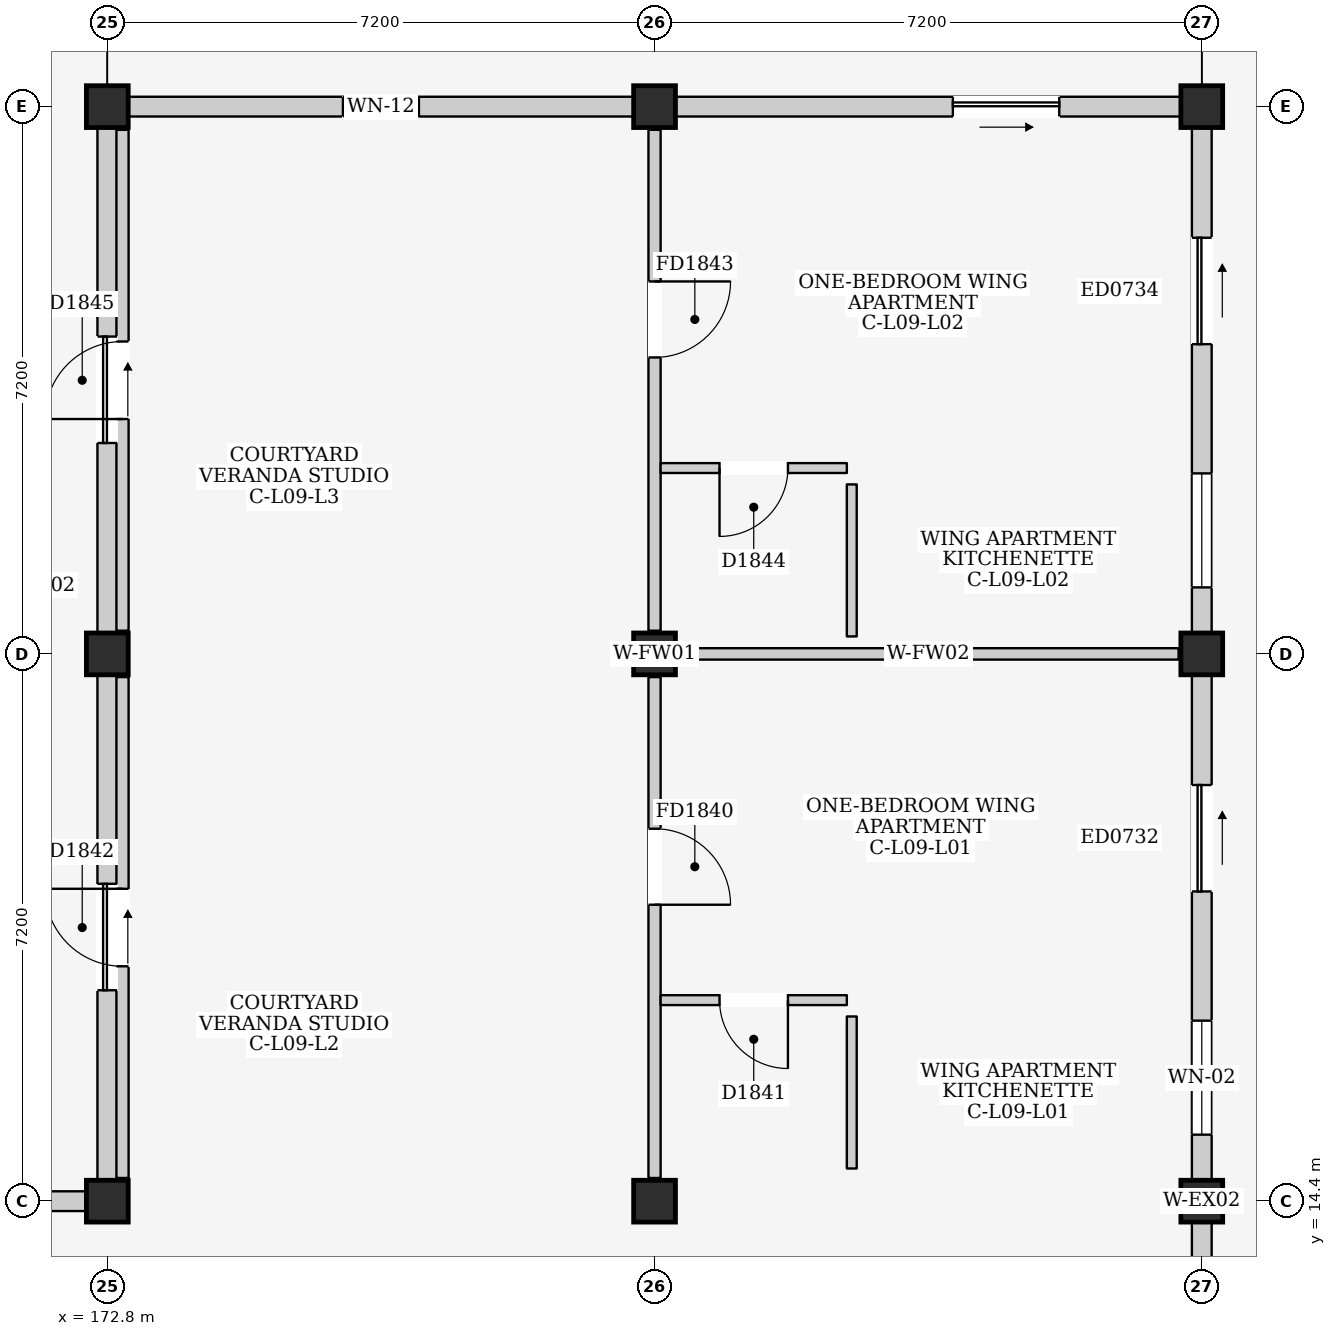
"""IFC4 building model, lengths in metres.
Left out: names, types, materials, properties, quantities, classifications, styles, units other than length and angle.
Written with IfcOpenShell. Run it as: python <this file> out.ifc"""

import sys

from ifc_helpers import new_model, si_unit, direction, frame, frame_2d, origin, origin_2d, place, context, subcontext, project, spatial, rectangle, extrude, element, fill, save


model = new_model("IFC4")
c1 = context("Model", 3, precision=1e-05, world=origin(), true_north=direction((0.0, 1.0)))
c2 = subcontext(c1, "Body", "Model", "MODEL_VIEW")
j1 = project(units=[si_unit("LENGTHUNIT", "METRE"), si_unit("PLANEANGLEUNIT", "RADIAN")], contexts=[c1])
p1 = place(None, origin())
s1 = spatial("IfcSite", under=j1, at=p1, CompositionType="ELEMENT")
p2 = place(p1, origin())
s2 = spatial("IfcBuilding", under=s1, at=p2, CompositionType="ELEMENT")
p3 = place(p2, frame((0.0, 0.0, 31.5)))
s3 = spatial("IfcBuildingStorey", under=s2, at=p3, CompositionType="ELEMENT", Elevation=31.5)
for number, where, z_axis, x_axis in (
    (1, (172.8, 14.4, 0.0), (0.0, 0.0, 1.0), (1.0, 0.0, 0.0)),
    (2, (172.8, 21.6, 0.0), (0.0, 0.0, 1.0), (1.0, 0.0, 0.0)),
    (3, (172.8, 28.8, 0.0), (0.0, 0.0, 1.0), (1.0, 0.0, 0.0)),
    (4, (180.0, 14.4, 0.0), (0.0, 0.0, 1.0), (1.0, 0.0, 0.0)),
    (5, (180.0, 21.6, 0.0), (0.0, 0.0, 1.0), (1.0, 0.0, 0.0)),
    (6, (180.0, 28.8, 0.0), (0.0, 0.0, 1.0), (1.0, 0.0, 0.0)),
    (7, (187.2, 14.4, 0.0), (0.0, 0.0, 1.0), (1.0, 0.0, 0.0)),
    (8, (187.2, 21.6, 0.0), (0.0, 0.0, 1.0), (1.0, 0.0, 0.0)),
    (9, (187.2, 28.8, 0.0), (0.0, 0.0, 1.0), (1.0, 0.0, 0.0)),
):
    element("IfcColumn", number, at=place(p3, frame(where, z_axis=z_axis, x_axis=x_axis)), inside=s3, PredefinedType="COLUMN", context=c2, shape_type="SweptSolid", body=[
        extrude(rectangle(XDim=0.55, YDim=0.55, at=origin_2d()), origin(), (0.0, 0.0, 1.0), 3.3),
    ])
p4 = place(p3, frame((165.875, 14.4, 0.0), z_axis=(0.0, 0.0, 1.0), x_axis=(1.0, 0.0, 0.0)))
e10 = element("IfcWall", 10, at=p4, inside=s3, PredefinedType="ELEMENTEDWALL", context=c2, shape_type="SweptSolid", body=[
    extrude(rectangle(XDim=6.65, YDim=0.26, at=frame_2d((3.325, 0.0))), origin(), (0.0, 0.0, 1.0), 2.465),
])
p5 = place(p4, frame((2.825, 0.0, 1.2)))
e11 = element("IfcOpeningElement", 11, at=p5, cuts=e10, PredefinedType="OPENING", context=c2, shape_type="SweptSolid", body=[
    extrude(rectangle(XDim=1.0, YDim=0.9, at=frame_2d((0.5, 0.45))), frame((0.0, 0.145, 0.0), z_axis=(0.0, -1.0, 0.0), x_axis=(1.0, 0.0, 0.0)), (0.0, 0.0, 1.0), 0.29),
])
p6 = place(p3, frame((172.8, 14.675, 0.0), z_axis=(0.0, 0.0, 1.0), x_axis=(0.0, 1.0, 0.0)))
e12 = element("IfcWall", 12, at=p6, inside=s3, PredefinedType="ELEMENTEDWALL", context=c2, shape_type="SweptSolid", body=[
    extrude(rectangle(XDim=6.65, YDim=0.26, at=frame_2d((3.325, 0.0))), origin(), (0.0, 0.0, 1.0), 2.565),
])
p7 = place(p6, frame((2.5, 0.0, 0.0)))
e13 = element("IfcOpeningElement", 13, at=p7, cuts=e12, PredefinedType="OPENING", context=c2, shape_type="SweptSolid", body=[
    extrude(rectangle(XDim=1.4, YDim=2.1, at=frame_2d((0.7, 1.05))), frame((0.0, 0.145, 0.0), z_axis=(0.0, -1.0, 0.0), x_axis=(1.0, 0.0, 0.0)), (0.0, 0.0, 1.0), 0.29),
])
p8 = place(p3, frame((173.075, 28.8, 0.0), z_axis=(0.0, 0.0, 1.0), x_axis=(1.0, 0.0, 0.0)))
e14 = element("IfcWall", 14, at=p8, inside=s3, PredefinedType="ELEMENTEDWALL", context=c2, shape_type="SweptSolid", body=[
    extrude(rectangle(XDim=6.65, YDim=0.26, at=frame_2d((3.325, 0.0))), origin(), (0.0, 0.0, 1.0), 2.465),
])
p9 = place(p8, frame((2.825, 0.0, 1.1)))
e15 = element("IfcOpeningElement", 15, at=p9, cuts=e14, PredefinedType="OPENING", context=c2, shape_type="SweptSolid", body=[
    extrude(rectangle(XDim=1.0, YDim=0.9, at=frame_2d((0.5, 0.45))), frame((0.0, 0.145, 0.0), z_axis=(0.0, -1.0, 0.0), x_axis=(1.0, 0.0, 0.0)), (0.0, 0.0, 1.0), 0.29),
])
p10 = place(p3, frame((172.8, 21.875, 0.0), z_axis=(0.0, 0.0, 1.0), x_axis=(0.0, 1.0, 0.0)))
e16 = element("IfcWall", 16, at=p10, inside=s3, PredefinedType="ELEMENTEDWALL", context=c2, shape_type="SweptSolid", body=[
    extrude(rectangle(XDim=6.65, YDim=0.26, at=frame_2d((3.325, 0.0))), origin(), (0.0, 0.0, 1.0), 2.565),
])
p11 = place(p10, frame((2.5, 0.0, 0.0)))
e17 = element("IfcOpeningElement", 17, at=p11, cuts=e16, PredefinedType="OPENING", context=c2, shape_type="SweptSolid", body=[
    extrude(rectangle(XDim=1.4, YDim=2.1, at=frame_2d((0.7, 1.05))), frame((0.0, 0.145, 0.0), z_axis=(0.0, -1.0, 0.0), x_axis=(1.0, 0.0, 0.0)), (0.0, 0.0, 1.0), 0.29),
])
p12 = place(p3, frame((187.2, 7.475, 0.0), z_axis=(0.0, 0.0, 1.0), x_axis=(0.0, 1.0, 0.0)))
e18 = element("IfcWall", 18, at=p12, inside=s3, PredefinedType="ELEMENTEDWALL", context=c2, shape_type="SweptSolid", body=[
    extrude(rectangle(XDim=6.65, YDim=0.26, at=frame_2d((3.325, 0.0))), origin(), (0.0, 0.0, 1.0), 2.615),
])
p13 = place(p12, frame((3.65, 0.0, 0.0)))
e19 = element("IfcOpeningElement", 19, at=p13, cuts=e18, PredefinedType="OPENING", context=c2, shape_type="SweptSolid", body=[
    extrude(rectangle(XDim=1.4, YDim=2.1, at=frame_2d((0.7, 1.05))), frame((0.0, 0.145, 0.0), z_axis=(0.0, -1.0, 0.0), x_axis=(1.0, 0.0, 0.0)), (0.0, 0.0, 1.0), 0.29),
])
p14 = place(p3, frame((187.2, 14.675, 0.0), z_axis=(0.0, 0.0, 1.0), x_axis=(0.0, 1.0, 0.0)))
e20 = element("IfcWall", 20, at=p14, inside=s3, PredefinedType="ELEMENTEDWALL", context=c2, shape_type="SweptSolid", body=[
    extrude(rectangle(XDim=6.65, YDim=0.26, at=frame_2d((3.325, 0.0))), origin(), (0.0, 0.0, 1.0), 2.615),
])
p15 = place(p14, frame((3.8, 0.0, 0.0)))
e21 = element("IfcOpeningElement", 21, at=p15, cuts=e20, PredefinedType="OPENING", context=c2, shape_type="SweptSolid", body=[
    extrude(rectangle(XDim=1.4, YDim=2.1, at=frame_2d((0.7, 1.05))), frame((0.0, 0.145, 0.0), z_axis=(0.0, -1.0, 0.0), x_axis=(1.0, 0.0, 0.0)), (0.0, 0.0, 1.0), 0.29),
])
p16 = place(p14, frame((0.6, 0.0, 0.95)))
e22 = element("IfcOpeningElement", 22, at=p16, cuts=e20, PredefinedType="OPENING", context=c2, shape_type="SweptSolid", body=[
    extrude(rectangle(XDim=1.5, YDim=1.5, at=frame_2d((0.75, 0.75))), frame((0.0, 0.145, 0.0), z_axis=(0.0, -1.0, 0.0), x_axis=(1.0, 0.0, 0.0)), (0.0, 0.0, 1.0), 0.29),
])
p17 = place(p3, frame((180.275, 28.8, 0.0), z_axis=(0.0, 0.0, 1.0), x_axis=(1.0, 0.0, 0.0)))
e23 = element("IfcWall", 23, at=p17, inside=s3, PredefinedType="ELEMENTEDWALL", context=c2, shape_type="SweptSolid", body=[
    extrude(rectangle(XDim=6.65, YDim=0.26, at=frame_2d((3.325, 0.0))), origin(), (0.0, 0.0, 1.0), 2.465),
])
p18 = place(p17, frame((3.65, 0.0, 0.0)))
e24 = element("IfcOpeningElement", 24, at=p18, cuts=e23, PredefinedType="OPENING", context=c2, shape_type="SweptSolid", body=[
    extrude(rectangle(XDim=1.4, YDim=2.1, at=frame_2d((0.7, 1.05))), frame((0.0, 0.145, 0.0), z_axis=(0.0, -1.0, 0.0), x_axis=(1.0, 0.0, 0.0)), (0.0, 0.0, 1.0), 0.29),
])
p19 = place(p3, frame((187.2, 21.875, 0.0), z_axis=(0.0, 0.0, 1.0), x_axis=(0.0, 1.0, 0.0)))
e25 = element("IfcWall", 25, at=p19, inside=s3, PredefinedType="ELEMENTEDWALL", context=c2, shape_type="SweptSolid", body=[
    extrude(rectangle(XDim=6.65, YDim=0.26, at=frame_2d((3.325, 0.0))), origin(), (0.0, 0.0, 1.0), 2.615),
])
p20 = place(p19, frame((3.8, 0.0, 0.0)))
e26 = element("IfcOpeningElement", 26, at=p20, cuts=e25, PredefinedType="OPENING", context=c2, shape_type="SweptSolid", body=[
    extrude(rectangle(XDim=1.4, YDim=2.1, at=frame_2d((0.7, 1.05))), frame((0.0, 0.145, 0.0), z_axis=(0.0, -1.0, 0.0), x_axis=(1.0, 0.0, 0.0)), (0.0, 0.0, 1.0), 0.29),
])
p21 = place(p19, frame((0.6, 0.0, 0.95)))
e27 = element("IfcOpeningElement", 27, at=p21, cuts=e25, PredefinedType="OPENING", context=c2, shape_type="SweptSolid", body=[
    extrude(rectangle(XDim=1.5, YDim=1.5, at=frame_2d((0.75, 0.75))), frame((0.0, 0.145, 0.0), z_axis=(0.0, -1.0, 0.0), x_axis=(1.0, 0.0, 0.0)), (0.0, 0.0, 1.0), 0.29),
])
p22 = place(p3, frame((180.0, 14.705, 0.0), z_axis=(0.0, 0.0, 1.0), x_axis=(0.0, 1.0, 0.0)))
e28 = element("IfcWall", 28, at=p22, inside=s3, PredefinedType="PARTITIONING", context=c2, shape_type="SweptSolid", body=[
    extrude(rectangle(XDim=6.59, YDim=0.16, at=frame_2d((3.295, 0.0))), origin(), (0.0, 0.0, 1.0), 2.565),
])
p23 = place(p22, frame((3.595, 0.0, 0.0)))
e29 = element("IfcOpeningElement", 29, at=p23, cuts=e28, PredefinedType="OPENING", context=c2, shape_type="SweptSolid", body=[
    extrude(rectangle(XDim=1.0, YDim=2.15, at=frame_2d((0.5, 1.075))), frame((0.0, 0.095, 0.0), z_axis=(0.0, -1.0, 0.0), x_axis=(1.0, 0.0, 0.0)), (0.0, 0.0, 1.0), 0.19),
])
p24 = place(p3, frame((180.305, 21.6, 0.0), z_axis=(0.0, 0.0, 1.0), x_axis=(1.0, 0.0, 0.0)))
e30 = element("IfcWall", 30, at=p24, inside=s3, PredefinedType="PARTITIONING", context=c2, shape_type="SweptSolid", body=[
    extrude(rectangle(XDim=6.59, YDim=0.15, at=frame_2d((3.295, 0.0))), origin(), (0.0, 0.0, 1.0), 2.465),
])
p25 = place(p3, frame((180.08, 17.045, 0.0), z_axis=(0.0, 0.0, 1.0), x_axis=(1.0, 0.0, 0.0)))
e31 = element("IfcWall", 31, at=p25, inside=s3, PredefinedType="PARTITIONING", context=c2, shape_type="SweptSolid", body=[
    extrude(rectangle(XDim=2.45, YDim=0.13, at=frame_2d((1.225, 0.0))), origin(), (0.0, 0.0, 1.0), 3.08),
])
p26 = place(p25, frame((0.775, 0.0, 0.0)))
e32 = element("IfcOpeningElement", 32, at=p26, cuts=e31, PredefinedType="OPENING", context=c2, shape_type="SweptSolid", body=[
    extrude(rectangle(XDim=0.9, YDim=2.1, at=frame_2d((0.45, 1.05))), frame((0.0, 0.08, 0.0), z_axis=(0.0, -1.0, 0.0), x_axis=(1.0, 0.0, 0.0)), (0.0, 0.0, 1.0), 0.16),
])
p27 = place(p3, frame((182.595, 14.83, 0.0), z_axis=(0.0, 0.0, 1.0), x_axis=(0.0, 1.0, 0.0)))
e33 = element("IfcWall", 33, at=p27, inside=s3, PredefinedType="PARTITIONING", context=c2, shape_type="SweptSolid", body=[
    extrude(rectangle(XDim=2.0, YDim=0.13, at=frame_2d((1.0, 0.0))), origin(), (0.0, 0.0, 1.0), 3.08),
])
p28 = place(p3, frame((173.0, 14.705, 0.0), z_axis=(0.0, 0.0, 1.0), x_axis=(0.0, 1.0, 0.0)))
e34 = element("IfcWall", 34, at=p28, inside=s3, PredefinedType="PARTITIONING", context=c2, shape_type="SweptSolid", body=[
    extrude(rectangle(XDim=6.59, YDim=0.16, at=frame_2d((3.295, 0.0))), origin(), (0.0, 0.0, 1.0), 3.08),
])
p29 = place(p28, frame((2.785, 0.0, 0.0)))
e35 = element("IfcOpeningElement", 35, at=p29, cuts=e34, PredefinedType="OPENING", context=c2, shape_type="SweptSolid", body=[
    extrude(rectangle(XDim=1.02, YDim=2.18, at=frame_2d((0.51, 1.09))), frame((0.0, 0.095, 0.0), z_axis=(0.0, -1.0, 0.0), x_axis=(1.0, 0.0, 0.0)), (0.0, 0.0, 1.0), 0.19),
])
p30 = place(p3, frame((180.0, 21.905, 0.0), z_axis=(0.0, 0.0, 1.0), x_axis=(0.0, 1.0, 0.0)))
e36 = element("IfcWall", 36, at=p30, inside=s3, PredefinedType="PARTITIONING", context=c2, shape_type="SweptSolid", body=[
    extrude(rectangle(XDim=6.59, YDim=0.16, at=frame_2d((3.295, 0.0))), origin(), (0.0, 0.0, 1.0), 2.565),
])
p31 = place(p30, frame((3.595, 0.0, 0.0)))
e37 = element("IfcOpeningElement", 37, at=p31, cuts=e36, PredefinedType="OPENING", context=c2, shape_type="SweptSolid", body=[
    extrude(rectangle(XDim=1.0, YDim=2.15, at=frame_2d((0.5, 1.075))), frame((0.0, 0.095, 0.0), z_axis=(0.0, -1.0, 0.0), x_axis=(1.0, 0.0, 0.0)), (0.0, 0.0, 1.0), 0.19),
])
p32 = place(p3, frame((180.08, 24.045, 0.0), z_axis=(0.0, 0.0, 1.0), x_axis=(1.0, 0.0, 0.0)))
e38 = element("IfcWall", 38, at=p32, inside=s3, PredefinedType="PARTITIONING", context=c2, shape_type="SweptSolid", body=[
    extrude(rectangle(XDim=2.45, YDim=0.13, at=frame_2d((1.225, 0.0))), origin(), (0.0, 0.0, 1.0), 3.08),
])
p33 = place(p32, frame((0.775, 0.0, 0.0)))
e39 = element("IfcOpeningElement", 39, at=p33, cuts=e38, PredefinedType="OPENING", context=c2, shape_type="SweptSolid", body=[
    extrude(rectangle(XDim=0.9, YDim=2.1, at=frame_2d((0.45, 1.05))), frame((0.0, 0.08, 0.0), z_axis=(0.0, -1.0, 0.0), x_axis=(1.0, 0.0, 0.0)), (0.0, 0.0, 1.0), 0.16),
])
p34 = place(p3, frame((182.595, 21.83, 0.0), z_axis=(0.0, 0.0, 1.0), x_axis=(0.0, 1.0, 0.0)))
e40 = element("IfcWall", 40, at=p34, inside=s3, PredefinedType="PARTITIONING", context=c2, shape_type="SweptSolid", body=[
    extrude(rectangle(XDim=2.0, YDim=0.13, at=frame_2d((1.0, 0.0))), origin(), (0.0, 0.0, 1.0), 3.08),
])
p35 = place(p3, frame((173.0, 21.905, 0.0), z_axis=(0.0, 0.0, 1.0), x_axis=(0.0, 1.0, 0.0)))
e41 = element("IfcWall", 41, at=p35, inside=s3, PredefinedType="PARTITIONING", context=c2, shape_type="SweptSolid", body=[
    extrude(rectangle(XDim=6.59, YDim=0.16, at=frame_2d((3.295, 0.0))), origin(), (0.0, 0.0, 1.0), 3.08),
])
p36 = place(p35, frame((2.785, 0.0, 0.0)))
e42 = element("IfcOpeningElement", 42, at=p36, cuts=e41, PredefinedType="OPENING", context=c2, shape_type="SweptSolid", body=[
    extrude(rectangle(XDim=1.02, YDim=2.18, at=frame_2d((0.51, 1.09))), frame((0.0, 0.095, 0.0), z_axis=(0.0, -1.0, 0.0), x_axis=(1.0, 0.0, 0.0)), (0.0, 0.0, 1.0), 0.19),
])
p37 = place(p7, frame((1.4, 0.0, 0.0), z_axis=(0.0, 0.0, 1.0), x_axis=(-1.0, 0.0, 0.0)))
e43 = element("IfcDoor", 43, at=p37, inside=s3, OperationType="SLIDING_TO_RIGHT", PredefinedType="DOOR", context=c2, shape_type="SweptSolid", body=[
    extrude(rectangle(XDim=1.4, YDim=2.1, at=frame_2d((0.7, 1.05))), frame((0.0, 0.025, 0.0), z_axis=(0.0, -1.0, 0.0), x_axis=(1.0, 0.0, 0.0)), (0.0, 0.0, 1.0), 0.05),
])
fill(e13, e43)
p38 = place(p9, origin())
e44 = element("IfcWindow", 44, at=p38, inside=s3, PartitioningType="SINGLE_PANEL", PredefinedType="WINDOW", context=c2, shape_type="SweptSolid", body=[
    extrude(rectangle(XDim=1.0, YDim=0.9, at=frame_2d((0.5, 0.45))), frame((0.0, 0.03, 0.0), z_axis=(0.0, -1.0, 0.0), x_axis=(1.0, 0.0, 0.0)), (0.0, 0.0, 1.0), 0.06),
])
fill(e15, e44)
p39 = place(p11, frame((1.4, 0.0, 0.0), z_axis=(0.0, 0.0, 1.0), x_axis=(-1.0, 0.0, 0.0)))
e45 = element("IfcDoor", 45, at=p39, inside=s3, OperationType="SLIDING_TO_RIGHT", PredefinedType="DOOR", context=c2, shape_type="SweptSolid", body=[
    extrude(rectangle(XDim=1.4, YDim=2.1, at=frame_2d((0.7, 1.05))), frame((0.0, 0.025, 0.0), z_axis=(0.0, -1.0, 0.0), x_axis=(1.0, 0.0, 0.0)), (0.0, 0.0, 1.0), 0.05),
])
fill(e17, e45)
p40 = place(p15, frame((1.4, 0.0, 0.0), z_axis=(0.0, 0.0, 1.0), x_axis=(-1.0, 0.0, 0.0)))
e46 = element("IfcDoor", 46, at=p40, inside=s3, OperationType="SLIDING_TO_RIGHT", PredefinedType="DOOR", context=c2, shape_type="SweptSolid", body=[
    extrude(rectangle(XDim=1.4, YDim=2.1, at=frame_2d((0.7, 1.05))), frame((0.0, 0.025, 0.0), z_axis=(0.0, -1.0, 0.0), x_axis=(1.0, 0.0, 0.0)), (0.0, 0.0, 1.0), 0.05),
])
fill(e21, e46)
p41 = place(p16, origin())
e47 = element("IfcWindow", 47, at=p41, inside=s3, PartitioningType="DOUBLE_PANEL_VERTICAL", PredefinedType="WINDOW", context=c2, shape_type="SweptSolid", body=[
    extrude(rectangle(XDim=1.5, YDim=1.5, at=frame_2d((0.75, 0.75))), frame((0.0, 0.03, 0.0), z_axis=(0.0, -1.0, 0.0), x_axis=(1.0, 0.0, 0.0)), (0.0, 0.0, 1.0), 0.06),
])
fill(e22, e47)
p42 = place(p18, frame((1.4, 0.0, 0.0), z_axis=(0.0, 0.0, 1.0), x_axis=(-1.0, 0.0, 0.0)))
e48 = element("IfcDoor", 48, at=p42, inside=s3, OperationType="SLIDING_TO_RIGHT", PredefinedType="DOOR", context=c2, shape_type="SweptSolid", body=[
    extrude(rectangle(XDim=1.4, YDim=2.1, at=frame_2d((0.7, 1.05))), frame((0.0, 0.025, 0.0), z_axis=(0.0, -1.0, 0.0), x_axis=(1.0, 0.0, 0.0)), (0.0, 0.0, 1.0), 0.05),
])
fill(e24, e48)
p43 = place(p20, frame((1.4, 0.0, 0.0), z_axis=(0.0, 0.0, 1.0), x_axis=(-1.0, 0.0, 0.0)))
e49 = element("IfcDoor", 49, at=p43, inside=s3, OperationType="SLIDING_TO_RIGHT", PredefinedType="DOOR", context=c2, shape_type="SweptSolid", body=[
    extrude(rectangle(XDim=1.4, YDim=2.1, at=frame_2d((0.7, 1.05))), frame((0.0, 0.025, 0.0), z_axis=(0.0, -1.0, 0.0), x_axis=(1.0, 0.0, 0.0)), (0.0, 0.0, 1.0), 0.05),
])
fill(e26, e49)
p44 = place(p21, origin())
e50 = element("IfcWindow", 50, at=p44, inside=s3, PartitioningType="DOUBLE_PANEL_VERTICAL", PredefinedType="WINDOW", context=c2, shape_type="SweptSolid", body=[
    extrude(rectangle(XDim=1.5, YDim=1.5, at=frame_2d((0.75, 0.75))), frame((0.0, 0.03, 0.0), z_axis=(0.0, -1.0, 0.0), x_axis=(1.0, 0.0, 0.0)), (0.0, 0.0, 1.0), 0.06),
])
fill(e27, e50)
p45 = place(p23, frame((1.0, 0.0, 0.0), z_axis=(0.0, 0.0, 1.0), x_axis=(-1.0, 0.0, 0.0)))
e51 = element("IfcDoor", 51, at=p45, inside=s3, OperationType="SINGLE_SWING_RIGHT", PredefinedType="DOOR", context=c2, shape_type="SweptSolid", body=[
    extrude(rectangle(XDim=1.0, YDim=2.15, at=frame_2d((0.5, 1.075))), frame((0.0, 0.025, 0.0), z_axis=(0.0, -1.0, 0.0), x_axis=(1.0, 0.0, 0.0)), (0.0, 0.0, 1.0), 0.05),
])
fill(e29, e51)
p46 = place(p26, frame((0.9, 0.0, 0.0), z_axis=(0.0, 0.0, 1.0), x_axis=(-1.0, 0.0, 0.0)))
e52 = element("IfcDoor", 52, at=p46, inside=s3, OperationType="SINGLE_SWING_LEFT", PredefinedType="DOOR", context=c2, shape_type="SweptSolid", body=[
    extrude(rectangle(XDim=0.9, YDim=2.1, at=frame_2d((0.45, 1.05))), frame((0.0, 0.025, 0.0), z_axis=(0.0, -1.0, 0.0), x_axis=(1.0, 0.0, 0.0)), (0.0, 0.0, 1.0), 0.05),
])
fill(e32, e52)
p47 = place(p29, origin())
e53 = element("IfcDoor", 53, at=p47, inside=s3, OperationType="SINGLE_SWING_RIGHT", PredefinedType="DOOR", context=c2, shape_type="SweptSolid", body=[
    extrude(rectangle(XDim=1.02, YDim=2.18, at=frame_2d((0.51, 1.09))), frame((0.0, 0.025, 0.0), z_axis=(0.0, -1.0, 0.0), x_axis=(1.0, 0.0, 0.0)), (0.0, 0.0, 1.0), 0.05),
])
fill(e35, e53)
p48 = place(p31, frame((1.0, 0.0, 0.0), z_axis=(0.0, 0.0, 1.0), x_axis=(-1.0, 0.0, 0.0)))
e54 = element("IfcDoor", 54, at=p48, inside=s3, OperationType="SINGLE_SWING_LEFT", PredefinedType="DOOR", context=c2, shape_type="SweptSolid", body=[
    extrude(rectangle(XDim=1.0, YDim=2.15, at=frame_2d((0.5, 1.075))), frame((0.0, 0.025, 0.0), z_axis=(0.0, -1.0, 0.0), x_axis=(1.0, 0.0, 0.0)), (0.0, 0.0, 1.0), 0.05),
])
fill(e37, e54)
p49 = place(p33, frame((0.9, 0.0, 0.0), z_axis=(0.0, 0.0, 1.0), x_axis=(-1.0, 0.0, 0.0)))
e55 = element("IfcDoor", 55, at=p49, inside=s3, OperationType="SINGLE_SWING_RIGHT", PredefinedType="DOOR", context=c2, shape_type="SweptSolid", body=[
    extrude(rectangle(XDim=0.9, YDim=2.1, at=frame_2d((0.45, 1.05))), frame((0.0, 0.025, 0.0), z_axis=(0.0, -1.0, 0.0), x_axis=(1.0, 0.0, 0.0)), (0.0, 0.0, 1.0), 0.05),
])
fill(e39, e55)
p50 = place(p36, origin())
e56 = element("IfcDoor", 56, at=p50, inside=s3, OperationType="SINGLE_SWING_LEFT", PredefinedType="DOOR", context=c2, shape_type="SweptSolid", body=[
    extrude(rectangle(XDim=1.02, YDim=2.18, at=frame_2d((0.51, 1.09))), frame((0.0, 0.025, 0.0), z_axis=(0.0, -1.0, 0.0), x_axis=(1.0, 0.0, 0.0)), (0.0, 0.0, 1.0), 0.05),
])
fill(e42, e56)
save(model, sys.argv[1])
